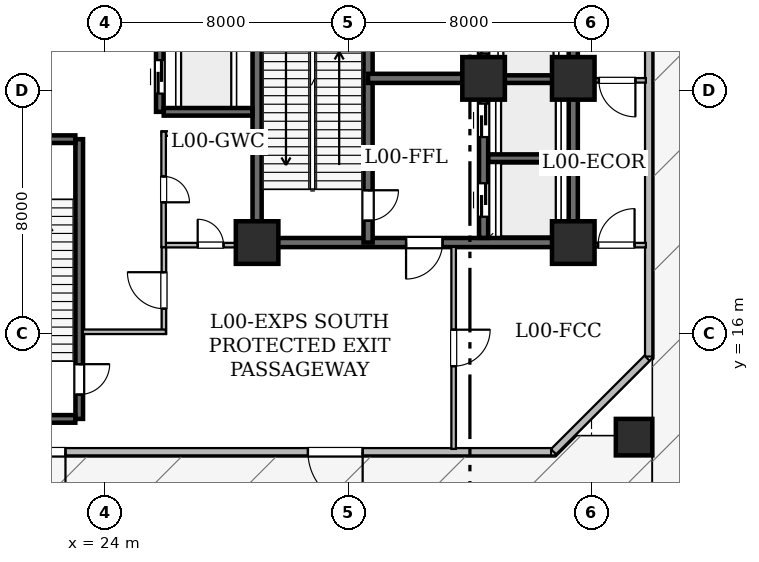
"""IFC4 building model, lengths in metres.
Left out: names, types, materials, properties, quantities, classifications, styles, units other than length and angle.
Written with IfcOpenShell. Run it as: python <this file> out.ifc"""

import sys

from ifc_helpers import new_model, si_unit, direction, frame, frame_2d, origin, origin_2d, place, context, subcontext, project, spatial, rectangle, hollow_rectangle, extrude, element, fill, save


model = new_model("IFC4")
c1 = context("Model", 3, precision=1e-05, world=origin(), true_north=direction((0.0, 1.0)))
c2 = subcontext(c1, "Body", "Model", "MODEL_VIEW")
j1 = project(units=[si_unit("LENGTHUNIT", "METRE"), si_unit("PLANEANGLEUNIT", "RADIAN")], contexts=[c1])
p1 = place(None, origin())
s1 = spatial("IfcSite", under=j1, at=p1, CompositionType="ELEMENT")
p2 = place(p1, origin())
s2 = spatial("IfcBuilding", under=s1, at=p2, CompositionType="ELEMENT")
p3 = place(p2, origin())
s3 = spatial("IfcBuildingStorey", under=s2, at=p3, CompositionType="ELEMENT", Elevation=0.0)
for number, where, z_axis, x_axis in (
    (1, (29.0, 19.0, 0.0), (0.0, 0.0, 1.0), (1.0, 0.0, 0.0)),
    (2, (39.4, 19.0, 0.0), (0.0, 0.0, 1.0), (1.0, 0.0, 0.0)),
    (3, (36.45, 24.4, 0.0), (0.0, 0.0, 1.0), (1.0, 0.0, 0.0)),
    (4, (39.4, 24.4, 0.0), (0.0, 0.0, 1.0), (1.0, 0.0, 0.0)),
):
    element("IfcColumn", number, at=place(p3, frame(where, z_axis=z_axis, x_axis=x_axis)), inside=s3, PredefinedType="COLUMN", context=c2, shape_type="SweptSolid", body=[
        extrude(hollow_rectangle(XDim=1.4, YDim=1.4, WallThickness=0.07, at=origin_2d()), origin(), (0.0, 0.0, 1.0), 7.2),
    ])
p4 = place(p3, frame((41.4, 12.6, 0.0), z_axis=(0.0, 0.0, 1.0), x_axis=(1.0, 0.0, 0.0)))
e5 = element("IfcColumn", 5, at=p4, inside=s3, PredefinedType="COLUMN", context=c2, shape_type="SweptSolid", body=[
    extrude(hollow_rectangle(XDim=1.2, YDim=1.2, WallThickness=0.06, at=origin_2d()), origin(), (0.0, 0.0, 1.0), 7.2),
])
p5 = place(p3, frame((41.88, 25.506, 0.0), z_axis=(0.0, 0.0, 1.0), x_axis=(0.0, -1.0, 0.0)))
e6 = element("IfcWall", 6, at=p5, inside=s3, PredefinedType="STANDARD", context=c2, shape_type="SweptSolid", body=[
    extrude(rectangle(XDim=10.256, YDim=0.24, at=frame_2d((5.128, 0.0))), origin(), (0.0, 0.0, 1.0), 6.78),
])
p6 = place(p3, frame((41.827, 15.197, 0.0), z_axis=(0.0, 0.0, 1.0), x_axis=(-0.707106781187, -0.707106781187, 0.0)))
e7 = element("IfcWall", 7, at=p6, inside=s3, PredefinedType="STANDARD", context=c2, shape_type="SweptSolid", body=[
    extrude(rectangle(XDim=4.351, YDim=0.24, at=frame_2d((2.176, 0.0))), origin(), (0.0, 0.0, 1.0), 6.78),
])
p7 = place(p3, frame((38.672, 12.12, 0.0), z_axis=(0.0, 0.0, 1.0), x_axis=(-1.0, 0.0, 0.0)))
e8 = element("IfcWall", 8, at=p7, inside=s3, PredefinedType="STANDARD", context=c2, shape_type="SweptSolid", body=[
    extrude(rectangle(XDim=19.575, YDim=0.24, at=frame_2d((9.788, 0.0))), origin(), (0.0, 0.0, 1.0), 6.78),
])
p8 = place(p7, frame((6.2, 0.0, 0.0)))
e9 = element("IfcOpeningElement", 9, at=p8, cuts=e8, PredefinedType="OPENING", context=c2, shape_type="SweptSolid", body=[
    extrude(rectangle(XDim=1.8, YDim=2.2, at=frame_2d((0.9, 1.1))), frame((0.0, 0.13, 0.0), z_axis=(0.0, -1.0, 0.0), x_axis=(1.0, 0.0, 0.0)), (0.0, 0.0, 1.0), 0.26),
])
p9 = place(p7, frame((15.975, 0.0, 0.0)))
e10 = element("IfcOpeningElement", 10, at=p9, cuts=e8, PredefinedType="OPENING", context=c2, shape_type="SweptSolid", body=[
    extrude(rectangle(XDim=1.8, YDim=2.2, at=frame_2d((0.9, 1.1))), frame((0.0, 0.13, 0.0), z_axis=(0.0, -1.0, 0.0), x_axis=(1.0, 0.0, 0.0)), (0.0, 0.0, 1.0), 0.26),
])
p10 = place(p3, frame((29.0, 19.0, 0.0), z_axis=(0.0, 0.0, 1.0), x_axis=(0.0, 1.0, 0.0)))
e11 = element("IfcWall", 11, at=p10, inside=s3, PredefinedType="SHEAR", context=c2, shape_type="SweptSolid", body=[
    extrude(rectangle(XDim=9.0, YDim=0.3, at=frame_2d((4.5, 0.0))), origin(), (0.0, 0.0, 1.0), 6.78),
])
p11 = place(p3, frame((39.4, 19.0, 0.0), z_axis=(0.0, 0.0, 1.0), x_axis=(-1.0, 0.0, 0.0)))
e12 = element("IfcWall", 12, at=p11, inside=s3, PredefinedType="SHEAR", context=c2, shape_type="SweptSolid", body=[
    extrude(rectangle(XDim=10.4, YDim=0.3, at=frame_2d((5.2, 0.0))), origin(), (0.0, 0.0, 1.0), 6.78),
])
p12 = place(p11, frame((4.3, 0.0, 0.0)))
e13 = element("IfcOpeningElement", 13, at=p12, cuts=e12, PredefinedType="OPENING", context=c2, shape_type="SweptSolid", body=[
    extrude(rectangle(XDim=1.2, YDim=2.15, at=frame_2d((0.6, 1.075))), frame((0.0, 0.16, 0.0), z_axis=(0.0, -1.0, 0.0), x_axis=(1.0, 0.0, 0.0)), (0.0, 0.0, 1.0), 0.32),
])
p13 = place(p3, frame((39.4, 19.0, 0.0), z_axis=(0.0, 0.0, 1.0), x_axis=(0.0, 1.0, 0.0)))
e14 = element("IfcWall", 14, at=p13, inside=s3, PredefinedType="SHEAR", context=c2, shape_type="SweptSolid", body=[
    extrude(rectangle(XDim=5.4, YDim=0.3, at=frame_2d((2.7, 0.0))), origin(), (0.0, 0.0, 1.0), 6.78),
])
p14 = place(p3, frame((39.4, 24.4, 0.0), z_axis=(0.0, 0.0, 1.0), x_axis=(0.0, 1.0, 0.0)))
e15 = element("IfcWall", 15, at=p14, inside=s3, PredefinedType="SHEAR", context=c2, shape_type="SweptSolid", body=[
    extrude(rectangle(XDim=12.6, YDim=0.3, at=frame_2d((6.3, 0.0))), origin(), (0.0, 0.0, 1.0), 6.78),
])
p15 = place(p3, frame((32.65, 28.0, 0.0), z_axis=(0.0, 0.0, 1.0), x_axis=(0.0, -1.0, 0.0)))
e16 = element("IfcWall", 16, at=p15, inside=s3, PredefinedType="SHEAR", context=c2, shape_type="SweptSolid", body=[
    extrude(rectangle(XDim=9.0, YDim=0.3, at=frame_2d((4.5, 0.0))), origin(), (0.0, 0.0, 1.0), 6.78),
])
p16 = place(p15, frame((7.28, 0.0, 0.0)))
e17 = element("IfcOpeningElement", 17, at=p16, cuts=e16, PredefinedType="OPENING", context=c2, shape_type="SweptSolid", body=[
    extrude(rectangle(XDim=1.0, YDim=2.15, at=frame_2d((0.5, 1.075))), frame((0.0, 0.16, 0.0), z_axis=(0.0, -1.0, 0.0), x_axis=(1.0, 0.0, 0.0)), (0.0, 0.0, 1.0), 0.32),
])
p17 = place(p3, frame((32.65, 24.4, 0.0), z_axis=(0.0, 0.0, 1.0), x_axis=(1.0, 0.0, 0.0)))
e18 = element("IfcWall", 18, at=p17, inside=s3, PredefinedType="SHEAR", context=c2, shape_type="SweptSolid", body=[
    extrude(rectangle(XDim=3.8, YDim=0.3, at=frame_2d((1.9, 0.0))), origin(), (0.0, 0.0, 1.0), 6.78),
])
p18 = place(p3, frame((36.45, 19.154, 0.0), z_axis=(0.0, 0.0, 1.0), x_axis=(0.0, 1.0, 0.0)))
e19 = element("IfcWall", 19, at=p18, inside=s3, PredefinedType="SHEAR", context=c2, shape_type="SweptSolid", body=[
    extrude(rectangle(XDim=4.546, YDim=0.3, at=frame_2d((2.273, 0.0))), origin(), (0.0, 0.0, 1.0), 6.78),
])
p19 = place(p18, frame((0.696, 0.0, 0.0)))
e20 = element("IfcOpeningElement", 20, at=p19, cuts=e19, PredefinedType="OPENING", context=c2, shape_type="SweptSolid", body=[
    extrude(rectangle(XDim=1.1, YDim=2.15, at=frame_2d((0.55, 1.075))), frame((0.0, 0.16, 0.0), z_axis=(0.0, -1.0, 0.0), x_axis=(1.0, 0.0, 0.0)), (0.0, 0.0, 1.0), 0.32),
])
p20 = place(p18, frame((3.316, 0.0, 0.0)))
e21 = element("IfcOpeningElement", 21, at=p20, cuts=e19, PredefinedType="OPENING", context=c2, shape_type="SweptSolid", body=[
    extrude(rectangle(XDim=1.1, YDim=2.15, at=frame_2d((0.55, 1.075))), frame((0.0, 0.16, 0.0), z_axis=(0.0, -1.0, 0.0), x_axis=(1.0, 0.0, 0.0)), (0.0, 0.0, 1.0), 0.32),
])
p21 = place(p3, frame((36.45, 25.1, 0.0), z_axis=(0.0, 0.0, 1.0), x_axis=(0.0, 1.0, 0.0)))
e22 = element("IfcWall", 22, at=p21, inside=s3, PredefinedType="SHEAR", context=c2, shape_type="SweptSolid", body=[
    extrude(rectangle(XDim=4.95, YDim=0.3, at=frame_2d((2.475, 0.0))), origin(), (0.0, 0.0, 1.0), 6.78),
])
p22 = place(p21, frame((0.12, 0.0, 0.0)))
e23 = element("IfcOpeningElement", 23, at=p22, cuts=e22, PredefinedType="OPENING", context=c2, shape_type="SweptSolid", body=[
    extrude(rectangle(XDim=1.05, YDim=2.15, at=frame_2d((0.525, 1.075))), frame((0.0, 0.16, 0.0), z_axis=(0.0, -1.0, 0.0), x_axis=(1.0, 0.0, 0.0)), (0.0, 0.0, 1.0), 0.32),
])
p23 = place(p21, frame((1.995, 0.0, 0.0)))
e24 = element("IfcOpeningElement", 24, at=p23, cuts=e22, PredefinedType="OPENING", context=c2, shape_type="SweptSolid", body=[
    extrude(rectangle(XDim=1.05, YDim=2.15, at=frame_2d((0.525, 1.075))), frame((0.0, 0.16, 0.0), z_axis=(0.0, -1.0, 0.0), x_axis=(1.0, 0.0, 0.0)), (0.0, 0.0, 1.0), 0.32),
])
p24 = place(p21, frame((3.795, 0.0, 0.0)))
e25 = element("IfcOpeningElement", 25, at=p24, cuts=e22, PredefinedType="OPENING", context=c2, shape_type="SweptSolid", body=[
    extrude(rectangle(XDim=1.05, YDim=2.15, at=frame_2d((0.525, 1.075))), frame((0.0, 0.16, 0.0), z_axis=(0.0, -1.0, 0.0), x_axis=(1.0, 0.0, 0.0)), (0.0, 0.0, 1.0), 0.32),
])
for number, where, z_axis, x_axis in (
    (26, (36.604, 21.775, 0.0), (0.0, 0.0, 1.0), (1.0, 0.0, 0.0)),
    (27, (36.604, 24.375, 0.0), (0.0, 0.0, 1.0), (1.0, 0.0, 0.0)),
):
    element("IfcWall", number, at=place(p3, frame(where, z_axis=z_axis, x_axis=x_axis)), inside=s3, PredefinedType="SHEAR", context=c2, shape_type="SweptSolid", body=[
        extrude(rectangle(XDim=2.642, YDim=0.25, at=frame_2d((1.321, 0.0))), origin(), (0.0, 0.0, 1.0), 6.78),
    ])
p25 = place(p3, frame((23.15, 22.4, 0.0), z_axis=(0.0, 0.0, 1.0), x_axis=(0.0, -1.0, 0.0)))
e28 = element("IfcWall", 28, at=p25, inside=s3, PredefinedType="SHEAR", context=c2, shape_type="SweptSolid", body=[
    extrude(rectangle(XDim=9.2, YDim=0.25, at=frame_2d((4.6, 0.0))), origin(), (0.0, 0.0, 1.0), 6.78),
])
p26 = place(p25, frame((7.4, 0.0, 0.0)))
e29 = element("IfcOpeningElement", 29, at=p26, cuts=e28, PredefinedType="OPENING", context=c2, shape_type="SweptSolid", body=[
    extrude(rectangle(XDim=1.0, YDim=2.15, at=frame_2d((0.5, 1.075))), frame((0.0, 0.135, 0.0), z_axis=(0.0, -1.0, 0.0), x_axis=(1.0, 0.0, 0.0)), (0.0, 0.0, 1.0), 0.27),
])
for number, where, z_axis, x_axis in (
    (30, (19.329, 13.2, 0.0), (0.0, 0.0, 1.0), (1.0, 0.0, 0.0)),
    (31, (19.329, 22.4, 0.0), (0.0, 0.0, 1.0), (1.0, 0.0, 0.0)),
):
    element("IfcWall", number, at=place(p3, frame(where, z_axis=z_axis, x_axis=x_axis)), inside=s3, PredefinedType="SHEAR", context=c2, shape_type="SweptSolid", body=[
        extrude(rectangle(XDim=3.692, YDim=0.25, at=frame_2d((1.846, 0.0))), origin(), (0.0, 0.0, 1.0), 6.78),
    ])
p27 = place(p3, frame((25.8, 23.3, 0.0), z_axis=(0.0, 0.0, 1.0), x_axis=(0.0, 1.0, 0.0)))
e32 = element("IfcWall", 32, at=p27, inside=s3, PredefinedType="SHEAR", context=c2, shape_type="SweptSolid", body=[
    extrude(rectangle(XDim=4.55, YDim=0.25, at=frame_2d((2.275, 0.0))), origin(), (0.0, 0.0, 1.0), 6.78),
])
p28 = place(p27, frame((0.6, 0.0, 0.0)))
e33 = element("IfcOpeningElement", 33, at=p28, cuts=e32, PredefinedType="OPENING", context=c2, shape_type="SweptSolid", body=[
    extrude(rectangle(XDim=1.1, YDim=2.15, at=frame_2d((0.55, 1.075))), frame((0.0, 0.135, 0.0), z_axis=(0.0, -1.0, 0.0), x_axis=(1.0, 0.0, 0.0)), (0.0, 0.0, 1.0), 0.27),
])
p29 = place(p27, frame((2.85, 0.0, 0.0)))
e34 = element("IfcOpeningElement", 34, at=p29, cuts=e32, PredefinedType="OPENING", context=c2, shape_type="SweptSolid", body=[
    extrude(rectangle(XDim=1.1, YDim=2.15, at=frame_2d((0.55, 1.075))), frame((0.0, 0.135, 0.0), z_axis=(0.0, -1.0, 0.0), x_axis=(1.0, 0.0, 0.0)), (0.0, 0.0, 1.0), 0.27),
])
p30 = place(p3, frame((25.929, 23.3, 0.0), z_axis=(0.0, 0.0, 1.0), x_axis=(1.0, 0.0, 0.0)))
e35 = element("IfcWall", 35, at=p30, inside=s3, PredefinedType="SHEAR", context=c2, shape_type="SweptSolid", body=[
    extrude(rectangle(XDim=2.917, YDim=0.25, at=frame_2d((1.458, 0.0))), origin(), (0.0, 0.0, 1.0), 6.78),
])
p31 = place(p3, frame((35.465, 18.856, 0.0), z_axis=(0.0, 0.0, 1.0), x_axis=(0.0, -1.0, 0.0)))
e36 = element("IfcWall", 36, at=p31, inside=s3, PredefinedType="STANDARD", context=c2, shape_type="SweptSolid", body=[
    extrude(rectangle(XDim=6.644, YDim=0.15, at=frame_2d((3.322, 0.0))), origin(), (0.0, 0.0, 1.0), 5.915),
])
p32 = place(p31, frame((2.722, 0.0, 0.0)))
e37 = element("IfcOpeningElement", 37, at=p32, cuts=e36, PredefinedType="OPENING", context=c2, shape_type="SweptSolid", body=[
    extrude(rectangle(XDim=1.2, YDim=2.15, at=frame_2d((0.6, 1.075))), frame((0.0, 0.085, 0.0), z_axis=(0.0, -1.0, 0.0), x_axis=(1.0, 0.0, 0.0)), (0.0, 0.0, 1.0), 0.17),
])
p33 = place(p3, frame((25.935, 16.0, 0.0), z_axis=(0.0, 0.0, 1.0), x_axis=(0.0, 1.0, 0.0)))
e38 = element("IfcWall", 38, at=p33, inside=s3, PredefinedType="STANDARD", context=c2, shape_type="SweptSolid", body=[
    extrude(rectangle(XDim=2.85, YDim=0.15, at=frame_2d((1.425, 0.0))), origin(), (0.0, 0.0, 1.0), 6.78),
])
p34 = place(p33, frame((0.825, 0.0, 0.0)))
e39 = element("IfcOpeningElement", 39, at=p34, cuts=e38, PredefinedType="OPENING", context=c2, shape_type="SweptSolid", body=[
    extrude(rectangle(XDim=1.2, YDim=2.15, at=frame_2d((0.6, 1.075))), frame((0.0, 0.085, 0.0), z_axis=(0.0, -1.0, 0.0), x_axis=(1.0, 0.0, 0.0)), (0.0, 0.0, 1.0), 0.17),
])
p35 = place(p3, frame((23.267, 16.065, 0.0), z_axis=(0.0, 0.0, 1.0), x_axis=(1.0, 0.0, 0.0)))
e40 = element("IfcWall", 40, at=p35, inside=s3, PredefinedType="STANDARD", context=c2, shape_type="SweptSolid", body=[
    extrude(rectangle(XDim=2.733, YDim=0.15, at=frame_2d((1.366, 0.0))), origin(), (0.0, 0.0, 1.0), 6.78),
])
p36 = place(p3, frame((26.0, 18.915, 0.0), z_axis=(0.0, 0.0, 1.0), x_axis=(1.0, 0.0, 0.0)))
e41 = element("IfcWall", 41, at=p36, inside=s3, PredefinedType="STANDARD", context=c2, shape_type="SweptSolid", body=[
    extrude(rectangle(XDim=2.943, YDim=0.15, at=frame_2d((1.472, 0.0))), origin(), (0.0, 0.0, 1.0), 6.237),
])
p37 = place(p36, frame((1.046, 0.0, 0.0)))
e42 = element("IfcOpeningElement", 42, at=p37, cuts=e41, PredefinedType="OPENING", context=c2, shape_type="SweptSolid", body=[
    extrude(rectangle(XDim=0.85, YDim=2.1, at=frame_2d((0.425, 1.05))), frame((0.0, 0.085, 0.0), z_axis=(0.0, -1.0, 0.0), x_axis=(1.0, 0.0, 0.0)), (0.0, 0.0, 1.0), 0.17),
])
p38 = place(p3, frame((39.457, 18.915, 0.0), z_axis=(0.0, 0.0, 1.0), x_axis=(1.0, 0.0, 0.0)))
e43 = element("IfcWall", 43, at=p38, inside=s3, PredefinedType="STANDARD", context=c2, shape_type="SweptSolid", body=[
    extrude(rectangle(XDim=2.331, YDim=0.15, at=frame_2d((1.166, 0.0))), origin(), (0.0, 0.0, 1.0), 5.915),
])
p39 = place(p38, frame((0.759, 0.0, 0.0)))
e44 = element("IfcOpeningElement", 44, at=p39, cuts=e43, PredefinedType="OPENING", context=c2, shape_type="SweptSolid", body=[
    extrude(rectangle(XDim=1.2, YDim=2.15, at=frame_2d((0.6, 1.075))), frame((0.0, 0.085, 0.0), z_axis=(0.0, -1.0, 0.0), x_axis=(1.0, 0.0, 0.0)), (0.0, 0.0, 1.0), 0.17),
])
p40 = place(p3, frame((28.856, 22.585, 0.0), z_axis=(0.0, 0.0, 1.0), x_axis=(-1.0, 0.0, 0.0)))
e45 = element("IfcWall", 45, at=p40, inside=s3, PredefinedType="STANDARD", context=c2, shape_type="SweptSolid", body=[
    extrude(rectangle(XDim=2.996, YDim=0.15, at=frame_2d((1.498, 0.0))), origin(), (0.0, 0.0, 1.0), 6.237),
])
p41 = place(p3, frame((25.925, 22.648, 0.0), z_axis=(0.0, 0.0, 1.0), x_axis=(0.0, -1.0, 0.0)))
e46 = element("IfcWall", 46, at=p41, inside=s3, PredefinedType="STANDARD", context=c2, shape_type="SweptSolid", body=[
    extrude(rectangle(XDim=3.798, YDim=0.15, at=frame_2d((1.899, 0.0))), origin(), (0.0, 0.0, 1.0), 6.78),
])
p42 = place(p41, frame((1.474, 0.0, 0.0)))
e47 = element("IfcOpeningElement", 47, at=p42, cuts=e46, PredefinedType="OPENING", context=c2, shape_type="SweptSolid", body=[
    extrude(rectangle(XDim=0.85, YDim=2.1, at=frame_2d((0.425, 1.05))), frame((0.0, 0.085, 0.0), z_axis=(0.0, -1.0, 0.0), x_axis=(1.0, 0.0, 0.0)), (0.0, 0.0, 1.0), 0.17),
])
p43 = place(p3, frame((41.788, 24.335, 0.0), z_axis=(0.0, 0.0, 1.0), x_axis=(-1.0, 0.0, 0.0)))
e48 = element("IfcWall", 48, at=p43, inside=s3, PredefinedType="STANDARD", context=c2, shape_type="SweptSolid", body=[
    extrude(rectangle(XDim=2.244, YDim=0.15, at=frame_2d((1.122, 0.0))), origin(), (0.0, 0.0, 1.0), 5.915),
])
p44 = place(p43, frame((0.345, 0.0, 0.0)))
e49 = element("IfcOpeningElement", 49, at=p44, cuts=e48, PredefinedType="OPENING", context=c2, shape_type="SweptSolid", body=[
    extrude(rectangle(XDim=1.2, YDim=2.15, at=frame_2d((0.6, 1.075))), frame((0.0, 0.085, 0.0), z_axis=(0.0, -1.0, 0.0), x_axis=(1.0, 0.0, 0.0)), (0.0, 0.0, 1.0), 0.17),
])
p45 = place(p8, origin())
e50 = element("IfcDoor", 50, at=p45, inside=s3, OperationType="SINGLE_SWING_LEFT", PredefinedType="DOOR", context=c2, shape_type="SweptSolid", body=[
    extrude(rectangle(XDim=1.8, YDim=2.2, at=frame_2d((0.9, 1.1))), frame((0.0, 0.025, 0.0), z_axis=(0.0, -1.0, 0.0), x_axis=(1.0, 0.0, 0.0)), (0.0, 0.0, 1.0), 0.05),
])
fill(e9, e50)
p46 = place(p9, origin())
e51 = element("IfcDoor", 51, at=p46, inside=s3, OperationType="SINGLE_SWING_LEFT", PredefinedType="DOOR", context=c2, shape_type="SweptSolid", body=[
    extrude(rectangle(XDim=1.8, YDim=2.2, at=frame_2d((0.9, 1.1))), frame((0.0, 0.025, 0.0), z_axis=(0.0, -1.0, 0.0), x_axis=(1.0, 0.0, 0.0)), (0.0, 0.0, 1.0), 0.05),
])
fill(e10, e51)
p47 = place(p16, origin())
e52 = element("IfcDoor", 52, at=p47, inside=s3, OperationType="SINGLE_SWING_LEFT", PredefinedType="DOOR", context=c2, shape_type="SweptSolid", body=[
    extrude(rectangle(XDim=1.0, YDim=2.15, at=frame_2d((0.5, 1.075))), frame((0.0, 0.025, 0.0), z_axis=(0.0, -1.0, 0.0), x_axis=(1.0, 0.0, 0.0)), (0.0, 0.0, 1.0), 0.05),
])
fill(e17, e52)
p48 = place(p12, origin())
e53 = element("IfcDoor", 53, at=p48, inside=s3, OperationType="SINGLE_SWING_RIGHT", PredefinedType="DOOR", context=c2, shape_type="SweptSolid", body=[
    extrude(rectangle(XDim=1.2, YDim=2.15, at=frame_2d((0.6, 1.075))), frame((0.0, 0.025, 0.0), z_axis=(0.0, -1.0, 0.0), x_axis=(1.0, 0.0, 0.0)), (0.0, 0.0, 1.0), 0.05),
])
fill(e13, e53)
p49 = place(p19, origin())
e54 = element("IfcDoor", 54, at=p49, inside=s3, OperationType="SLIDING_TO_LEFT", PredefinedType="DOOR", context=c2, shape_type="SweptSolid", body=[
    extrude(rectangle(XDim=1.1, YDim=2.15, at=frame_2d((0.55, 1.075))), frame((0.0, 0.025, 0.0), z_axis=(0.0, -1.0, 0.0), x_axis=(1.0, 0.0, 0.0)), (0.0, 0.0, 1.0), 0.05),
])
fill(e20, e54)
p50 = place(p20, origin())
e55 = element("IfcDoor", 55, at=p50, inside=s3, OperationType="SLIDING_TO_LEFT", PredefinedType="DOOR", context=c2, shape_type="SweptSolid", body=[
    extrude(rectangle(XDim=1.1, YDim=2.15, at=frame_2d((0.55, 1.075))), frame((0.0, 0.025, 0.0), z_axis=(0.0, -1.0, 0.0), x_axis=(1.0, 0.0, 0.0)), (0.0, 0.0, 1.0), 0.05),
])
fill(e21, e55)
p51 = place(p22, origin())
e56 = element("IfcDoor", 56, at=p51, inside=s3, OperationType="SLIDING_TO_LEFT", PredefinedType="DOOR", context=c2, shape_type="SweptSolid", body=[
    extrude(rectangle(XDim=1.05, YDim=2.15, at=frame_2d((0.525, 1.075))), frame((0.0, 0.025, 0.0), z_axis=(0.0, -1.0, 0.0), x_axis=(1.0, 0.0, 0.0)), (0.0, 0.0, 1.0), 0.05),
])
fill(e23, e56)
p52 = place(p26, origin())
e57 = element("IfcDoor", 57, at=p52, inside=s3, OperationType="SINGLE_SWING_LEFT", PredefinedType="DOOR", context=c2, shape_type="SweptSolid", body=[
    extrude(rectangle(XDim=1.0, YDim=2.15, at=frame_2d((0.5, 1.075))), frame((0.0, 0.025, 0.0), z_axis=(0.0, -1.0, 0.0), x_axis=(1.0, 0.0, 0.0)), (0.0, 0.0, 1.0), 0.05),
])
fill(e29, e57)
p53 = place(p28, origin())
e58 = element("IfcDoor", 58, at=p53, inside=s3, OperationType="SLIDING_TO_LEFT", PredefinedType="DOOR", context=c2, shape_type="SweptSolid", body=[
    extrude(rectangle(XDim=1.1, YDim=2.15, at=frame_2d((0.55, 1.075))), frame((0.0, 0.025, 0.0), z_axis=(0.0, -1.0, 0.0), x_axis=(1.0, 0.0, 0.0)), (0.0, 0.0, 1.0), 0.05),
])
fill(e33, e58)
p54 = place(p32, origin())
e59 = element("IfcDoor", 59, at=p54, inside=s3, OperationType="SINGLE_SWING_LEFT", PredefinedType="DOOR", context=c2, shape_type="SweptSolid", body=[
    extrude(rectangle(XDim=1.2, YDim=2.15, at=frame_2d((0.6, 1.075))), frame((0.0, 0.025, 0.0), z_axis=(0.0, -1.0, 0.0), x_axis=(1.0, 0.0, 0.0)), (0.0, 0.0, 1.0), 0.05),
])
fill(e37, e59)
p55 = place(p34, origin())
e60 = element("IfcDoor", 60, at=p55, inside=s3, OperationType="SINGLE_SWING_RIGHT", PredefinedType="DOOR", context=c2, shape_type="SweptSolid", body=[
    extrude(rectangle(XDim=1.2, YDim=2.15, at=frame_2d((0.6, 1.075))), frame((0.0, 0.025, 0.0), z_axis=(0.0, -1.0, 0.0), x_axis=(1.0, 0.0, 0.0)), (0.0, 0.0, 1.0), 0.05),
])
fill(e39, e60)
p56 = place(p37, origin())
e61 = element("IfcDoor", 61, at=p56, inside=s3, OperationType="SINGLE_SWING_LEFT", PredefinedType="DOOR", context=c2, shape_type="SweptSolid", body=[
    extrude(rectangle(XDim=0.85, YDim=2.1, at=frame_2d((0.425, 1.05))), frame((0.0, 0.025, 0.0), z_axis=(0.0, -1.0, 0.0), x_axis=(1.0, 0.0, 0.0)), (0.0, 0.0, 1.0), 0.05),
])
fill(e42, e61)
p57 = place(p39, origin())
e62 = element("IfcDoor", 62, at=p57, inside=s3, OperationType="SINGLE_SWING_RIGHT", PredefinedType="DOOR", context=c2, shape_type="SweptSolid", body=[
    extrude(rectangle(XDim=1.2, YDim=2.15, at=frame_2d((0.6, 1.075))), frame((0.0, 0.025, 0.0), z_axis=(0.0, -1.0, 0.0), x_axis=(1.0, 0.0, 0.0)), (0.0, 0.0, 1.0), 0.05),
])
fill(e44, e62)
p58 = place(p42, origin())
e63 = element("IfcDoor", 63, at=p58, inside=s3, OperationType="SINGLE_SWING_RIGHT", PredefinedType="DOOR", context=c2, shape_type="SweptSolid", body=[
    extrude(rectangle(XDim=0.85, YDim=2.1, at=frame_2d((0.425, 1.05))), frame((0.0, 0.025, 0.0), z_axis=(0.0, -1.0, 0.0), x_axis=(1.0, 0.0, 0.0)), (0.0, 0.0, 1.0), 0.05),
])
fill(e47, e63)
p59 = place(p44, origin())
e64 = element("IfcDoor", 64, at=p59, inside=s3, OperationType="SINGLE_SWING_LEFT", PredefinedType="DOOR", context=c2, shape_type="SweptSolid", body=[
    extrude(rectangle(XDim=1.2, YDim=2.15, at=frame_2d((0.6, 1.075))), frame((0.0, 0.025, 0.0), z_axis=(0.0, -1.0, 0.0), x_axis=(1.0, 0.0, 0.0)), (0.0, 0.0, 1.0), 0.05),
])
fill(e49, e64)
save(model, sys.argv[1])
